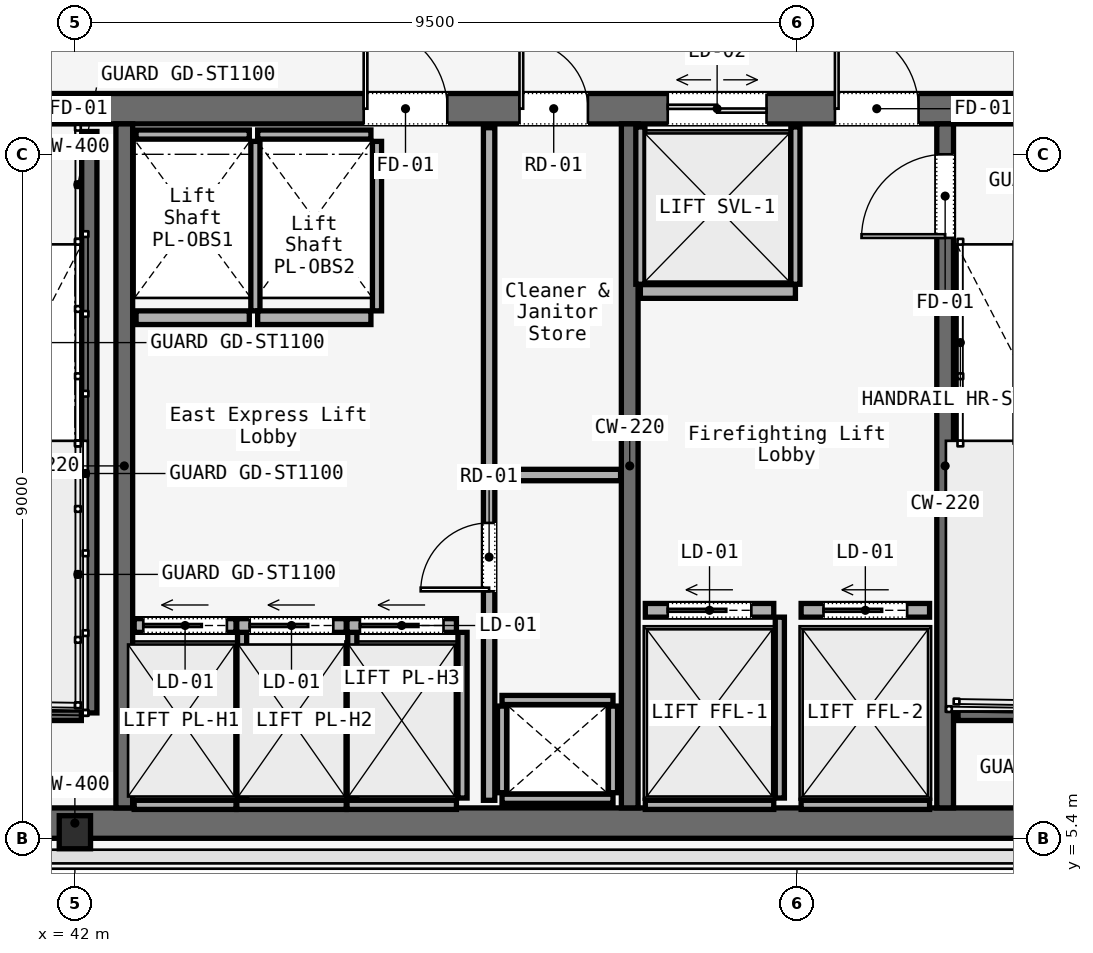
"""IFC4 building model, lengths in metres.
Left out: names, types, materials, properties, quantities, classifications, styles, units other than length and angle.
Written with IfcOpenShell. Run it as: python <this file> out.ifc"""

import sys

from ifc_helpers import new_model, si_unit, direction, frame, frame_2d, origin, origin_2d, place, context, subcontext, project, spatial, rectangle, i_section, extrude, element, fill, save


model = new_model("IFC4")
c1 = context("Model", 3, precision=1e-05, world=origin(), true_north=direction((0.0, 1.0)))
c2 = subcontext(c1, "Body", "Model", "MODEL_VIEW")
j1 = project(units=[si_unit("LENGTHUNIT", "METRE"), si_unit("PLANEANGLEUNIT", "RADIAN")], contexts=[c1])
p1 = place(None, origin())
s1 = spatial("IfcSite", under=j1, at=p1, CompositionType="ELEMENT")
p2 = place(p1, origin())
s2 = spatial("IfcBuilding", under=s1, at=p2, CompositionType="ELEMENT")
p3 = place(p2, frame((0.0, 0.0, 240.8)))
s3 = spatial("IfcBuildingStorey", under=s2, at=p3, CompositionType="ELEMENT", Elevation=240.8)
p4 = place(p3, frame((26.45, 15.0, 0.0), z_axis=(0.0, 0.0, 1.0), x_axis=(1.0, 0.0, 0.0)))
e1 = element("IfcWall", 1, at=p4, inside=s3, PredefinedType="SOLIDWALL", context=c2, shape_type="SweptSolid", body=[
    extrude(rectangle(XDim=31.1, YDim=0.4, at=frame_2d((15.55, 0.0))), origin(), (0.0, 0.0, 1.0), 3.58),
])
p5 = place(p4, frame((1.65, 0.0, 0.0)))
e2 = element("IfcOpeningElement", 2, at=p5, cuts=e1, PredefinedType="OPENING", context=c2, shape_type="SweptSolid", body=[
    extrude(rectangle(XDim=1.1, YDim=2.2, at=frame_2d((0.55, 1.1))), frame((0.0, 0.2, 0.0), z_axis=(0.0, -1.0, 0.0), x_axis=(1.0, 0.0, 0.0)), (0.0, 0.0, 1.0), 0.4),
])
p6 = place(p4, frame((13.65, 0.0, 0.0)))
e3 = element("IfcOpeningElement", 3, at=p6, cuts=e1, PredefinedType="OPENING", context=c2, shape_type="SweptSolid", body=[
    extrude(rectangle(XDim=1.1, YDim=2.2, at=frame_2d((0.55, 1.1))), frame((0.0, 0.2, 0.0), z_axis=(0.0, -1.0, 0.0), x_axis=(1.0, 0.0, 0.0)), (0.0, 0.0, 1.0), 0.4),
])
p7 = place(p4, frame((25.55, 0.0, 0.0)))
e4 = element("IfcOpeningElement", 4, at=p7, cuts=e1, PredefinedType="OPENING", context=c2, shape_type="SweptSolid", body=[
    extrude(rectangle(XDim=1.1, YDim=2.2, at=frame_2d((0.55, 1.1))), frame((0.0, 0.2, 0.0), z_axis=(0.0, -1.0, 0.0), x_axis=(1.0, 0.0, 0.0)), (0.0, 0.0, 1.0), 0.4),
])
p8 = place(p4, frame((19.35, 0.0, 0.0)))
e5 = element("IfcOpeningElement", 5, at=p8, cuts=e1, PredefinedType="OPENING", context=c2, shape_type="SweptSolid", body=[
    extrude(rectangle(XDim=1.1, YDim=2.2, at=frame_2d((0.55, 1.1))), frame((0.0, 0.2, 0.0), z_axis=(0.0, -1.0, 0.0), x_axis=(1.0, 0.0, 0.0)), (0.0, 0.0, 1.0), 0.4),
])
p9 = place(p4, frame((21.4, 0.0, 0.0)))
e6 = element("IfcOpeningElement", 6, at=p9, cuts=e1, PredefinedType="OPENING", context=c2, shape_type="SweptSolid", body=[
    extrude(rectangle(XDim=0.9, YDim=2.1, at=frame_2d((0.45, 1.05))), frame((0.0, 0.2, 0.0), z_axis=(0.0, -1.0, 0.0), x_axis=(1.0, 0.0, 0.0)), (0.0, 0.0, 1.0), 0.4),
])
p10 = place(p4, frame((6.04, 0.0, 0.0)))
e7 = element("IfcOpeningElement", 7, at=p10, cuts=e1, PredefinedType="OPENING", context=c2, shape_type="SweptSolid", body=[
    extrude(rectangle(XDim=0.95, YDim=2.2, at=frame_2d((0.475, 1.1))), frame((0.0, 0.2, 0.0), z_axis=(0.0, -1.0, 0.0), x_axis=(1.0, 0.0, 0.0)), (0.0, 0.0, 1.0), 0.4),
])
p11 = place(p4, frame((9.99, 0.0, 0.0)))
e8 = element("IfcOpeningElement", 8, at=p11, cuts=e1, PredefinedType="OPENING", context=c2, shape_type="SweptSolid", body=[
    extrude(rectangle(XDim=0.95, YDim=2.2, at=frame_2d((0.475, 1.1))), frame((0.0, 0.2, 0.0), z_axis=(0.0, -1.0, 0.0), x_axis=(1.0, 0.0, 0.0)), (0.0, 0.0, 1.0), 0.4),
])
p12 = place(p4, frame((23.35, 0.0, 0.0)))
e9 = element("IfcOpeningElement", 9, at=p12, cuts=e1, PredefinedType="OPENING", context=c2, shape_type="SweptSolid", body=[
    extrude(rectangle(XDim=1.3, YDim=2.3, at=frame_2d((0.65, 1.15))), frame((0.0, 0.2, 0.0), z_axis=(0.0, -1.0, 0.0), x_axis=(1.0, 0.0, 0.0)), (0.0, 0.0, 1.0), 0.4),
])
p13 = place(p3, frame((26.45, 5.6, 0.0), z_axis=(0.0, 0.0, 1.0), x_axis=(1.0, 0.0, 0.0)))
e10 = element("IfcWall", 10, at=p13, inside=s3, PredefinedType="SOLIDWALL", context=c2, shape_type="SweptSolid", body=[
    extrude(rectangle(XDim=31.1, YDim=0.4, at=frame_2d((15.55, 0.0))), origin(), (0.0, 0.0, 1.0), 3.58),
])
for number, where, z_axis, x_axis in (
    (11, (42.65, 5.8, 0.0), (0.0, 0.0, 1.0), (0.0, 1.0, 0.0)),
    (12, (49.3, 5.8, 0.0), (0.0, 0.0, 1.0), (0.0, 1.0, 0.0)),
):
    element("IfcWall", number, at=place(p3, frame(where, z_axis=z_axis, x_axis=x_axis)), inside=s3, PredefinedType="SOLIDWALL", context=c2, shape_type="SweptSolid", body=[
        extrude(rectangle(XDim=9.0, YDim=0.22, at=frame_2d((4.5, 0.0))), origin(), (0.0, 0.0, 1.0), 3.58),
    ])
p14 = place(p3, frame((53.45, 5.8, 0.0), z_axis=(0.0, 0.0, 1.0), x_axis=(0.0, 1.0, 0.0)))
e13 = element("IfcWall", 13, at=p14, inside=s3, PredefinedType="SOLIDWALL", context=c2, shape_type="SweptSolid", body=[
    extrude(rectangle(XDim=9.0, YDim=0.22, at=frame_2d((4.5, 0.0))), origin(), (0.0, 0.0, 1.0), 3.58),
])
p15 = place(p14, frame((7.5, 0.0, 0.0)))
e14 = element("IfcOpeningElement", 14, at=p15, cuts=e13, PredefinedType="OPENING", context=c2, shape_type="SweptSolid", body=[
    extrude(rectangle(XDim=1.1, YDim=2.2, at=frame_2d((0.55, 1.1))), frame((0.0, 0.11, 0.0), z_axis=(0.0, -1.0, 0.0), x_axis=(1.0, 0.0, 0.0)), (0.0, 0.0, 1.0), 0.22),
])
p16 = place(p3, frame((42.0, 5.48, 0.0), z_axis=(0.0, 0.0, 1.0), x_axis=(1.0, 0.0, 0.0)))
e15 = element("IfcColumn", 15, at=p16, inside=s3, PredefinedType="COLUMN", context=c2, shape_type="SweptSolid", body=[
    extrude(i_section(OverallWidth=0.412, OverallDepth=0.435, WebThickness=0.036, FlangeThickness=0.044, FilletRadius=0.015, at=origin_2d()), origin(), (0.0, 0.0, 1.0), 3.58),
])
p17 = place(p3, frame((42.19, 14.7, 0.0), z_axis=(0.0, 0.0, 1.0), x_axis=(0.0, -1.0, 0.0)))
e16 = element("IfcWall", 16, at=p17, inside=s3, PredefinedType="SOLIDWALL", context=c2, shape_type="SweptSolid", body=[
    extrude(rectangle(XDim=7.65, YDim=0.2, at=frame_2d((3.825, 0.0))), origin(), (0.0, 0.0, 1.0), 3.8),
])
for number, where, z_axis, x_axis in (
    (17, (38.97, 7.05, 0.0), (0.0, 0.0, 1.0), (1.0, 0.0, 0.0)),
    (18, (53.62, 7.05, 0.0), (0.0, 0.0, 1.0), (1.0, 0.0, 0.0)),
):
    element("IfcWall", number, at=place(p3, frame(where, z_axis=z_axis, x_axis=x_axis)), inside=s3, PredefinedType="SOLIDWALL", context=c2, shape_type="SweptSolid", body=[
        extrude(rectangle(XDim=3.115, YDim=0.2, at=frame_2d((1.558, 0.0))), origin(), (0.0, 0.0, 1.0), 3.8),
    ])
for number, where, z_axis, x_axis in (
    (19, (47.62, 5.92, 0.0), (0.0, 0.0, 1.0), (1.0, 0.0, 0.0)),
    (20, (47.62, 7.22, 0.0), (0.0, 0.0, 1.0), (1.0, 0.0, 0.0)),
):
    element("IfcWall", number, at=place(p3, frame(where, z_axis=z_axis, x_axis=x_axis)), inside=s3, PredefinedType="SOLIDWALL", context=c2, shape_type="SweptSolid", body=[
        extrude(rectangle(XDim=1.46, YDim=0.12, at=frame_2d((0.73, 0.0))), origin(), (0.0, 0.0, 1.0), 3.01),
    ])
for number, where, z_axis, x_axis in (
    (21, (47.62, 6.0, 0.0), (0.0, 0.0, 1.0), (0.0, 1.0, 0.0)),
    (22, (49.08, 6.0, 0.0), (0.0, 0.0, 1.0), (0.0, 1.0, 0.0)),
):
    element("IfcWall", number, at=place(p3, frame(where, z_axis=z_axis, x_axis=x_axis)), inside=s3, PredefinedType="SOLIDWALL", context=c2, shape_type="SweptSolid", body=[
        extrude(rectangle(XDim=1.14, YDim=0.12, at=frame_2d((0.57, 0.0))), origin(), (0.0, 0.0, 1.0), 3.01),
    ])
p18 = place(p3, frame((47.45, 5.9, 0.0), z_axis=(0.0, 0.0, 1.0), x_axis=(0.0, 1.0, 0.0)))
e23 = element("IfcWall", 23, at=p18, inside=s3, PredefinedType="PARTITIONING", context=c2, shape_type="SweptSolid", body=[
    extrude(rectangle(XDim=8.85, YDim=0.15, at=frame_2d((4.425, 0.0))), origin(), (0.0, 0.0, 1.0), 3.01),
])
p19 = place(p18, frame((2.75, 0.0, 0.0)))
e24 = element("IfcOpeningElement", 24, at=p19, cuts=e23, PredefinedType="OPENING", context=c2, shape_type="SweptSolid", body=[
    extrude(rectangle(XDim=0.9, YDim=2.1, at=frame_2d((0.45, 1.05))), frame((0.0, 0.075, 0.0), z_axis=(0.0, -1.0, 0.0), x_axis=(1.0, 0.0, 0.0)), (0.0, 0.0, 1.0), 0.15),
])
p20 = place(p3, frame((47.45, 10.18, 0.0), z_axis=(0.0, 0.0, 1.0), x_axis=(1.0, 0.0, 0.0)))
e25 = element("IfcWall", 25, at=p20, inside=s3, PredefinedType="PARTITIONING", context=c2, shape_type="SweptSolid", body=[
    extrude(rectangle(XDim=1.73, YDim=0.15, at=frame_2d((0.865, 0.0))), origin(), (0.0, 0.0, 1.0), 3.01),
])
p21 = place(p3, frame((42.78, 8.2, 0.0), z_axis=(0.0, 0.0, 1.0), x_axis=(1.0, 0.0, 0.0)))
e26 = element("IfcWall", 26, at=p21, inside=s3, PredefinedType="SOLIDWALL", context=c2, shape_type="SweptSolid", body=[
    extrude(rectangle(XDim=1.34, YDim=0.18, at=frame_2d((0.67, 0.0))), origin(), (0.0, 0.0, 1.0), 3.01),
])
p22 = place(p21, frame((0.12, 0.0, 0.0)))
e27 = element("IfcOpeningElement", 27, at=p22, cuts=e26, PredefinedType="OPENING", context=c2, shape_type="SweptSolid", body=[
    extrude(rectangle(XDim=1.1, YDim=2.2, at=frame_2d((0.55, 1.1))), frame((0.0, 0.09, 0.0), z_axis=(0.0, -1.0, 0.0), x_axis=(1.0, 0.0, 0.0)), (0.0, 0.0, 1.0), 0.18),
])
p23 = place(p3, frame((42.78, 5.84, 0.0), z_axis=(0.0, 0.0, 1.0), x_axis=(1.0, 0.0, 0.0)))
e28 = element("IfcWall", 28, at=p23, inside=s3, PredefinedType="SOLIDWALL", context=c2, shape_type="SweptSolid", body=[
    extrude(rectangle(XDim=1.34, YDim=0.12, at=frame_2d((0.67, 0.0))), origin(), (0.0, 0.0, 1.0), 3.01),
])
p24 = place(p3, frame((44.2, 5.93, 0.0), z_axis=(0.0, 0.0, 1.0), x_axis=(0.0, 1.0, 0.0)))
e29 = element("IfcWall", 29, at=p24, inside=s3, PredefinedType="SOLIDWALL", context=c2, shape_type="SweptSolid", body=[
    extrude(rectangle(XDim=2.18, YDim=0.12, at=frame_2d((1.09, 0.0))), origin(), (0.0, 0.0, 1.0), 3.01),
])
p25 = place(p3, frame((44.13, 8.2, 0.0), z_axis=(0.0, 0.0, 1.0), x_axis=(1.0, 0.0, 0.0)))
e30 = element("IfcWall", 30, at=p25, inside=s3, PredefinedType="SOLIDWALL", context=c2, shape_type="SweptSolid", body=[
    extrude(rectangle(XDim=1.44, YDim=0.18, at=frame_2d((0.72, 0.0))), origin(), (0.0, 0.0, 1.0), 3.01),
])
p26 = place(p25, frame((0.17, 0.0, 0.0)))
e31 = element("IfcOpeningElement", 31, at=p26, cuts=e30, PredefinedType="OPENING", context=c2, shape_type="SweptSolid", body=[
    extrude(rectangle(XDim=1.1, YDim=2.2, at=frame_2d((0.55, 1.1))), frame((0.0, 0.09, 0.0), z_axis=(0.0, -1.0, 0.0), x_axis=(1.0, 0.0, 0.0)), (0.0, 0.0, 1.0), 0.18),
])
p27 = place(p3, frame((44.13, 5.84, 0.0), z_axis=(0.0, 0.0, 1.0), x_axis=(1.0, 0.0, 0.0)))
e32 = element("IfcWall", 32, at=p27, inside=s3, PredefinedType="SOLIDWALL", context=c2, shape_type="SweptSolid", body=[
    extrude(rectangle(XDim=1.44, YDim=0.12, at=frame_2d((0.72, 0.0))), origin(), (0.0, 0.0, 1.0), 3.01),
])
p28 = place(p3, frame((45.65, 5.93, 0.0), z_axis=(0.0, 0.0, 1.0), x_axis=(0.0, 1.0, 0.0)))
e33 = element("IfcWall", 33, at=p28, inside=s3, PredefinedType="SOLIDWALL", context=c2, shape_type="SweptSolid", body=[
    extrude(rectangle(XDim=2.18, YDim=0.12, at=frame_2d((1.09, 0.0))), origin(), (0.0, 0.0, 1.0), 3.01),
])
p29 = place(p3, frame((45.58, 8.2, 0.0), z_axis=(0.0, 0.0, 1.0), x_axis=(1.0, 0.0, 0.0)))
e34 = element("IfcWall", 34, at=p29, inside=s3, PredefinedType="SOLIDWALL", context=c2, shape_type="SweptSolid", body=[
    extrude(rectangle(XDim=1.44, YDim=0.18, at=frame_2d((0.72, 0.0))), origin(), (0.0, 0.0, 1.0), 3.01),
])
p30 = place(p29, frame((0.17, 0.0, 0.0)))
e35 = element("IfcOpeningElement", 35, at=p30, cuts=e34, PredefinedType="OPENING", context=c2, shape_type="SweptSolid", body=[
    extrude(rectangle(XDim=1.1, YDim=2.2, at=frame_2d((0.55, 1.1))), frame((0.0, 0.09, 0.0), z_axis=(0.0, -1.0, 0.0), x_axis=(1.0, 0.0, 0.0)), (0.0, 0.0, 1.0), 0.18),
])
p31 = place(p3, frame((45.58, 5.84, 0.0), z_axis=(0.0, 0.0, 1.0), x_axis=(1.0, 0.0, 0.0)))
e36 = element("IfcWall", 36, at=p31, inside=s3, PredefinedType="SOLIDWALL", context=c2, shape_type="SweptSolid", body=[
    extrude(rectangle(XDim=1.44, YDim=0.12, at=frame_2d((0.72, 0.0))), origin(), (0.0, 0.0, 1.0), 3.01),
])
p32 = place(p3, frame((47.1, 5.93, 0.0), z_axis=(0.0, 0.0, 1.0), x_axis=(0.0, 1.0, 0.0)))
e37 = element("IfcWall", 37, at=p32, inside=s3, PredefinedType="SOLIDWALL", context=c2, shape_type="SweptSolid", body=[
    extrude(rectangle(XDim=2.18, YDim=0.12, at=frame_2d((1.09, 0.0))), origin(), (0.0, 0.0, 1.0), 3.01),
])
p33 = place(p3, frame((42.805, 12.25, 0.0), z_axis=(0.0, 0.0, 1.0), x_axis=(1.0, 0.0, 0.0)))
e38 = element("IfcWall", 38, at=p33, inside=s3, PredefinedType="SOLIDWALL", context=c2, shape_type="SweptSolid", body=[
    extrude(rectangle(XDim=1.49, YDim=0.18, at=frame_2d((0.745, 0.0))), origin(), (0.0, 0.0, 1.0), 3.01),
])
p34 = place(p3, frame((42.805, 14.66, 0.0), z_axis=(0.0, 0.0, 1.0), x_axis=(1.0, 0.0, 0.0)))
e39 = element("IfcWall", 39, at=p34, inside=s3, PredefinedType="SOLIDWALL", context=c2, shape_type="SweptSolid", body=[
    extrude(rectangle(XDim=1.49, YDim=0.12, at=frame_2d((0.745, 0.0))), origin(), (0.0, 0.0, 1.0), 3.01),
])
p35 = place(p3, frame((44.375, 12.34, 0.0), z_axis=(0.0, 0.0, 1.0), x_axis=(0.0, 1.0, 0.0)))
e40 = element("IfcWall", 40, at=p35, inside=s3, PredefinedType="SOLIDWALL", context=c2, shape_type="SweptSolid", body=[
    extrude(rectangle(XDim=2.23, YDim=0.12, at=frame_2d((1.115, 0.0))), origin(), (0.0, 0.0, 1.0), 3.01),
])
p36 = place(p3, frame((44.405, 12.25, 0.0), z_axis=(0.0, 0.0, 1.0), x_axis=(1.0, 0.0, 0.0)))
e41 = element("IfcWall", 41, at=p36, inside=s3, PredefinedType="SOLIDWALL", context=c2, shape_type="SweptSolid", body=[
    extrude(rectangle(XDim=1.49, YDim=0.18, at=frame_2d((0.745, 0.0))), origin(), (0.0, 0.0, 1.0), 3.01),
])
p37 = place(p3, frame((44.405, 14.66, 0.0), z_axis=(0.0, 0.0, 1.0), x_axis=(1.0, 0.0, 0.0)))
e42 = element("IfcWall", 42, at=p37, inside=s3, PredefinedType="SOLIDWALL", context=c2, shape_type="SweptSolid", body=[
    extrude(rectangle(XDim=1.49, YDim=0.12, at=frame_2d((0.745, 0.0))), origin(), (0.0, 0.0, 1.0), 3.01),
])
p38 = place(p3, frame((45.975, 12.34, 0.0), z_axis=(0.0, 0.0, 1.0), x_axis=(0.0, 1.0, 0.0)))
e43 = element("IfcWall", 43, at=p38, inside=s3, PredefinedType="SOLIDWALL", context=c2, shape_type="SweptSolid", body=[
    extrude(rectangle(XDim=2.23, YDim=0.12, at=frame_2d((1.115, 0.0))), origin(), (0.0, 0.0, 1.0), 3.01),
])
p39 = place(p3, frame((49.505, 8.4, 0.0), z_axis=(0.0, 0.0, 1.0), x_axis=(1.0, 0.0, 0.0)))
e44 = element("IfcWall", 44, at=p39, inside=s3, PredefinedType="SOLIDWALL", context=c2, shape_type="SweptSolid", body=[
    extrude(rectangle(XDim=1.69, YDim=0.18, at=frame_2d((0.845, 0.0))), origin(), (0.0, 0.0, 1.0), 3.01),
])
p40 = place(p39, frame((0.295, 0.0, 0.0)))
e45 = element("IfcOpeningElement", 45, at=p40, cuts=e44, PredefinedType="OPENING", context=c2, shape_type="SweptSolid", body=[
    extrude(rectangle(XDim=1.1, YDim=2.2, at=frame_2d((0.55, 1.1))), frame((0.0, 0.09, 0.0), z_axis=(0.0, -1.0, 0.0), x_axis=(1.0, 0.0, 0.0)), (0.0, 0.0, 1.0), 0.18),
])
p41 = place(p3, frame((49.505, 5.84, 0.0), z_axis=(0.0, 0.0, 1.0), x_axis=(1.0, 0.0, 0.0)))
e46 = element("IfcWall", 46, at=p41, inside=s3, PredefinedType="SOLIDWALL", context=c2, shape_type="SweptSolid", body=[
    extrude(rectangle(XDim=1.69, YDim=0.12, at=frame_2d((0.845, 0.0))), origin(), (0.0, 0.0, 1.0), 3.01),
])
p42 = place(p3, frame((51.275, 5.93, 0.0), z_axis=(0.0, 0.0, 1.0), x_axis=(0.0, 1.0, 0.0)))
e47 = element("IfcWall", 47, at=p42, inside=s3, PredefinedType="SOLIDWALL", context=c2, shape_type="SweptSolid", body=[
    extrude(rectangle(XDim=2.38, YDim=0.12, at=frame_2d((1.19, 0.0))), origin(), (0.0, 0.0, 1.0), 3.01),
])
p43 = place(p3, frame((51.555, 8.4, 0.0), z_axis=(0.0, 0.0, 1.0), x_axis=(1.0, 0.0, 0.0)))
e48 = element("IfcWall", 48, at=p43, inside=s3, PredefinedType="SOLIDWALL", context=c2, shape_type="SweptSolid", body=[
    extrude(rectangle(XDim=1.69, YDim=0.18, at=frame_2d((0.845, 0.0))), origin(), (0.0, 0.0, 1.0), 3.01),
])
p44 = place(p43, frame((0.295, 0.0, 0.0)))
e49 = element("IfcOpeningElement", 49, at=p44, cuts=e48, PredefinedType="OPENING", context=c2, shape_type="SweptSolid", body=[
    extrude(rectangle(XDim=1.1, YDim=2.2, at=frame_2d((0.55, 1.1))), frame((0.0, 0.09, 0.0), z_axis=(0.0, -1.0, 0.0), x_axis=(1.0, 0.0, 0.0)), (0.0, 0.0, 1.0), 0.18),
])
p45 = place(p3, frame((51.555, 5.84, 0.0), z_axis=(0.0, 0.0, 1.0), x_axis=(1.0, 0.0, 0.0)))
e50 = element("IfcWall", 50, at=p45, inside=s3, PredefinedType="SOLIDWALL", context=c2, shape_type="SweptSolid", body=[
    extrude(rectangle(XDim=1.69, YDim=0.12, at=frame_2d((0.845, 0.0))), origin(), (0.0, 0.0, 1.0), 3.01),
])
p46 = place(p3, frame((49.44, 12.595, 0.0), z_axis=(0.0, 0.0, 1.0), x_axis=(1.0, 0.0, 0.0)))
e51 = element("IfcWall", 51, at=p46, inside=s3, PredefinedType="SOLIDWALL", context=c2, shape_type="SweptSolid", body=[
    extrude(rectangle(XDim=2.04, YDim=0.18, at=frame_2d((1.02, 0.0))), origin(), (0.0, 0.0, 1.0), 3.01),
])
for number, where, z_axis, x_axis in (
    (52, (49.44, 12.69, 0.0), (0.0, 0.0, 1.0), (0.0, 1.0, 0.0)),
    (53, (51.48, 12.69, 0.0), (0.0, 0.0, 1.0), (0.0, 1.0, 0.0)),
):
    element("IfcWall", number, at=place(p3, frame(where, z_axis=z_axis, x_axis=x_axis)), inside=s3, PredefinedType="SOLIDWALL", context=c2, shape_type="SweptSolid", body=[
        extrude(rectangle(XDim=2.07, YDim=0.12, at=frame_2d((1.035, 0.0))), origin(), (0.0, 0.0, 1.0), 3.01),
    ])
p47 = place(p7, origin())
e54 = element("IfcDoor", 54, at=p47, inside=s3, OperationType="SINGLE_SWING_RIGHT", PredefinedType="DOOR", context=c2, shape_type="SweptSolid", body=[
    extrude(rectangle(XDim=1.1, YDim=2.2, at=frame_2d((0.55, 1.1))), frame((0.0, 0.025, 0.0), z_axis=(0.0, -1.0, 0.0), x_axis=(1.0, 0.0, 0.0)), (0.0, 0.0, 1.0), 0.05),
])
fill(e4, e54)
p48 = place(p8, origin())
e55 = element("IfcDoor", 55, at=p48, inside=s3, OperationType="SINGLE_SWING_LEFT", PredefinedType="DOOR", context=c2, shape_type="SweptSolid", body=[
    extrude(rectangle(XDim=1.1, YDim=2.2, at=frame_2d((0.55, 1.1))), frame((0.0, 0.025, 0.0), z_axis=(0.0, -1.0, 0.0), x_axis=(1.0, 0.0, 0.0)), (0.0, 0.0, 1.0), 0.05),
])
fill(e5, e55)
p49 = place(p9, origin())
e56 = element("IfcDoor", 56, at=p49, inside=s3, OperationType="SINGLE_SWING_LEFT", PredefinedType="DOOR", context=c2, shape_type="SweptSolid", body=[
    extrude(rectangle(XDim=0.9, YDim=2.1, at=frame_2d((0.45, 1.05))), frame((0.0, 0.025, 0.0), z_axis=(0.0, -1.0, 0.0), x_axis=(1.0, 0.0, 0.0)), (0.0, 0.0, 1.0), 0.05),
])
fill(e6, e56)
p50 = place(p15, origin())
e57 = element("IfcDoor", 57, at=p50, inside=s3, OperationType="SINGLE_SWING_LEFT", PredefinedType="DOOR", context=c2, shape_type="SweptSolid", body=[
    extrude(rectangle(XDim=1.1, YDim=2.2, at=frame_2d((0.55, 1.1))), frame((0.0, 0.025, 0.0), z_axis=(0.0, -1.0, 0.0), x_axis=(1.0, 0.0, 0.0)), (0.0, 0.0, 1.0), 0.05),
])
fill(e14, e57)
p51 = place(p19, origin())
e58 = element("IfcDoor", 58, at=p51, inside=s3, OperationType="SINGLE_SWING_RIGHT", PredefinedType="DOOR", context=c2, shape_type="SweptSolid", body=[
    extrude(rectangle(XDim=0.9, YDim=2.1, at=frame_2d((0.45, 1.05))), frame((0.0, 0.025, 0.0), z_axis=(0.0, -1.0, 0.0), x_axis=(1.0, 0.0, 0.0)), (0.0, 0.0, 1.0), 0.05),
])
fill(e24, e58)
p52 = place(p22, origin())
e59 = element("IfcDoor", 59, at=p52, inside=s3, OperationType="SLIDING_TO_LEFT", PredefinedType="DOOR", context=c2, shape_type="SweptSolid", body=[
    extrude(rectangle(XDim=1.1, YDim=2.2, at=frame_2d((0.55, 1.1))), frame((0.0, 0.025, 0.0), z_axis=(0.0, -1.0, 0.0), x_axis=(1.0, 0.0, 0.0)), (0.0, 0.0, 1.0), 0.05),
])
fill(e27, e59)
p53 = place(p26, origin())
e60 = element("IfcDoor", 60, at=p53, inside=s3, OperationType="SLIDING_TO_LEFT", PredefinedType="DOOR", context=c2, shape_type="SweptSolid", body=[
    extrude(rectangle(XDim=1.1, YDim=2.2, at=frame_2d((0.55, 1.1))), frame((0.0, 0.025, 0.0), z_axis=(0.0, -1.0, 0.0), x_axis=(1.0, 0.0, 0.0)), (0.0, 0.0, 1.0), 0.05),
])
fill(e31, e60)
p54 = place(p30, origin())
e61 = element("IfcDoor", 61, at=p54, inside=s3, OperationType="SLIDING_TO_LEFT", PredefinedType="DOOR", context=c2, shape_type="SweptSolid", body=[
    extrude(rectangle(XDim=1.1, YDim=2.2, at=frame_2d((0.55, 1.1))), frame((0.0, 0.025, 0.0), z_axis=(0.0, -1.0, 0.0), x_axis=(1.0, 0.0, 0.0)), (0.0, 0.0, 1.0), 0.05),
])
fill(e35, e61)
p55 = place(p40, origin())
e62 = element("IfcDoor", 62, at=p55, inside=s3, OperationType="SLIDING_TO_LEFT", PredefinedType="DOOR", context=c2, shape_type="SweptSolid", body=[
    extrude(rectangle(XDim=1.1, YDim=2.2, at=frame_2d((0.55, 1.1))), frame((0.0, 0.025, 0.0), z_axis=(0.0, -1.0, 0.0), x_axis=(1.0, 0.0, 0.0)), (0.0, 0.0, 1.0), 0.05),
])
fill(e45, e62)
p56 = place(p44, origin())
e63 = element("IfcDoor", 63, at=p56, inside=s3, OperationType="SLIDING_TO_LEFT", PredefinedType="DOOR", context=c2, shape_type="SweptSolid", body=[
    extrude(rectangle(XDim=1.1, YDim=2.2, at=frame_2d((0.55, 1.1))), frame((0.0, 0.025, 0.0), z_axis=(0.0, -1.0, 0.0), x_axis=(1.0, 0.0, 0.0)), (0.0, 0.0, 1.0), 0.05),
])
fill(e49, e63)
p57 = place(p12, origin())
e64 = element("IfcDoor", 64, at=p57, inside=s3, OperationType="DOUBLE_DOOR_SLIDING", PredefinedType="DOOR", context=c2, shape_type="SweptSolid", body=[
    extrude(rectangle(XDim=1.3, YDim=2.3, at=frame_2d((0.65, 1.15))), frame((0.0, 0.025, 0.0), z_axis=(0.0, -1.0, 0.0), x_axis=(1.0, 0.0, 0.0)), (0.0, 0.0, 1.0), 0.05),
])
fill(e9, e64)
save(model, sys.argv[1])
